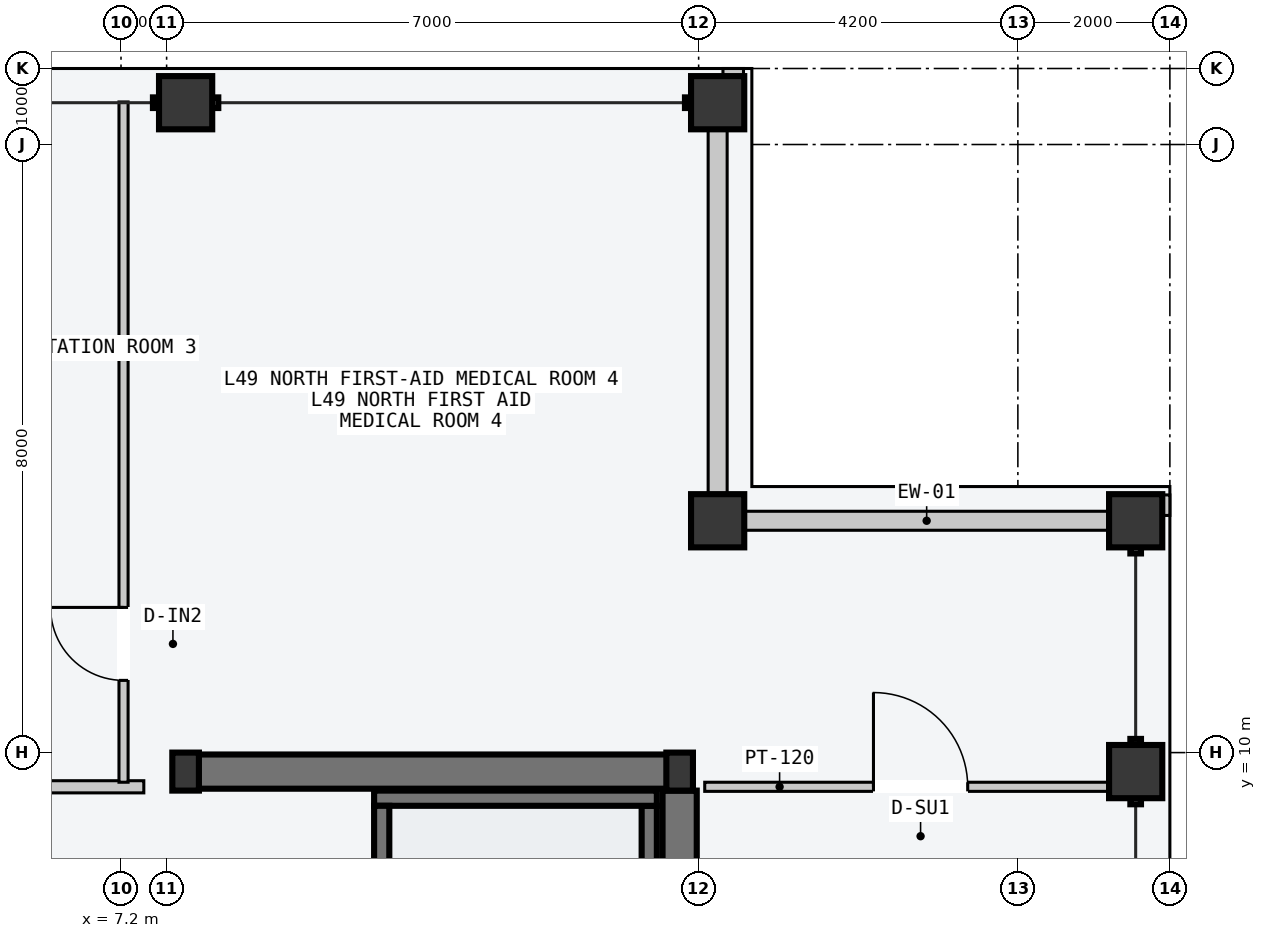
"""IFC4 building model, lengths in metres.
Left out: names, types, materials, properties, quantities, classifications, styles, units other than length and angle.
Written with IfcOpenShell. Run it as: python <this file> out.ifc"""

import sys

from ifc_helpers import new_model, si_unit, direction, frame, frame_2d, origin, origin_2d, place, context, subcontext, project, spatial, rectangle, hollow_rectangle, i_section, extrude, element, fill, save


model = new_model("IFC4")
c1 = context("Model", 3, precision=1e-05, world=origin(), true_north=direction((0.0, 1.0)))
c2 = subcontext(c1, "Body", "Model", "MODEL_VIEW")
j1 = project(units=[si_unit("LENGTHUNIT", "METRE"), si_unit("PLANEANGLEUNIT", "RADIAN")], contexts=[c1])
p1 = place(None, origin())
s1 = spatial("IfcSite", under=j1, at=p1, CompositionType="ELEMENT")
p2 = place(p1, origin())
s2 = spatial("IfcBuilding", under=s1, at=p2, CompositionType="ELEMENT")
p3 = place(p2, frame((0.0, 0.0, 187.5)))
s3 = spatial("IfcBuildingStorey", under=s2, at=p3, CompositionType="ELEMENT", Elevation=187.5)
p4 = place(p3, frame((8.07, 9.75, -0.2), z_axis=(0.0, 0.0, 1.0), x_axis=(1.0, 0.0, 0.0)))
e1 = element("IfcWall", 1, at=p4, inside=s3, PredefinedType="SHEAR", context=c2, shape_type="SweptSolid", body=[
    extrude(rectangle(XDim=6.46, YDim=0.45, at=frame_2d((3.23, 0.0))), origin(), (0.0, 0.0, 1.0), 3.6),
])
p5 = place(p3, frame((14.55, 0.25, -0.2), z_axis=(0.0, 0.0, 1.0), x_axis=(0.0, 1.0, 0.0)))
e2 = element("IfcWall", 2, at=p5, inside=s3, PredefinedType="SHEAR", context=c2, shape_type="SweptSolid", body=[
    extrude(rectangle(XDim=9.25, YDim=0.45, at=frame_2d((4.625, 0.0))), origin(), (0.0, 0.0, 1.0), 3.6),
])
p6 = place(p3, frame((14.15, 1.5, -0.2), z_axis=(0.0, 0.0, 1.0), x_axis=(0.0, 1.0, 0.0)))
e3 = element("IfcWall", 3, at=p6, inside=s3, PredefinedType="SOLIDWALL", context=c2, shape_type="SweptSolid", body=[
    extrude(rectangle(XDim=7.8, YDim=0.2, at=frame_2d((3.9, 0.0))), origin(), (0.0, 0.0, 1.0), 3.6),
])
p7 = place(p3, frame((10.53, 9.4, -0.2), z_axis=(0.0, 0.0, 1.0), x_axis=(1.0, 0.0, 0.0)))
e4 = element("IfcWall", 4, at=p7, inside=s3, PredefinedType="SOLIDWALL", context=c2, shape_type="SweptSolid", body=[
    extrude(rectangle(XDim=3.72, YDim=0.2, at=frame_2d((1.86, 0.0))), origin(), (0.0, 0.0, 1.0), 3.6),
])
p8 = place(p3, frame((10.63, 1.5, -0.2), z_axis=(0.0, 0.0, 1.0), x_axis=(0.0, 1.0, 0.0)))
e5 = element("IfcWall", 5, at=p8, inside=s3, PredefinedType="SOLIDWALL", context=c2, shape_type="SweptSolid", body=[
    extrude(rectangle(XDim=7.8, YDim=0.2, at=frame_2d((3.9, 0.0))), origin(), (0.0, 0.0, 1.0), 3.6),
])
for number, where, z_axis, x_axis in (
    (6, (8.05, 9.75, 0.0), (0.0, 0.0, 1.0), (1.0, 0.0, 0.0)),
    (7, (14.55, 9.75, 0.0), (0.0, 0.0, 1.0), (1.0, 0.0, 0.0)),
):
    element("IfcColumn", number, at=place(p3, frame(where, z_axis=z_axis, x_axis=x_axis)), inside=s3, PredefinedType="COLUMN", context=c2, shape_type="SweptSolid", body=[
        extrude(i_section(OverallWidth=0.35, OverallDepth=0.5, WebThickness=0.02, FlangeThickness=0.032, at=origin_2d()), origin(), (0.0, 0.0, 1.0), 3.6),
    ])
for number, where, z_axis, x_axis in (
    (8, (8.05, 18.55, 0.0), (0.0, 0.0, 1.0), (1.0, 0.0, 0.0)),
    (9, (15.05, 18.55, 0.0), (0.0, 0.0, 1.0), (1.0, 0.0, 0.0)),
    (10, (20.55, 9.75, 0.0), (0.0, 0.0, 1.0), (0.0, 1.0, 0.0)),
    (11, (20.55, 13.05, 0.0), (0.0, 0.0, 1.0), (0.0, 1.0, 0.0)),
    (12, (15.05, 13.05, 0.0), (0.0, 0.0, 1.0), (1.0, 0.0, 0.0)),
):
    element("IfcColumn", number, at=place(p3, frame(where, z_axis=z_axis, x_axis=x_axis)), inside=s3, PredefinedType="COLUMN", context=c2, shape_type="SweptSolid", body=[
        extrude(hollow_rectangle(XDim=0.7, YDim=0.7, WallThickness=0.03, at=origin_2d()), origin(), (0.0, 0.0, 1.0), 3.6),
    ])
for number, where, z_axis, x_axis in (
    (13, (15.41, 13.05, 0.0), (0.0, 0.0, 1.0), (1.0, 0.0, 0.0)),
    (14, (15.05, 13.41, 0.0), (0.0, 0.0, 1.0), (0.0, 1.0, 0.0)),
):
    element("IfcWall", number, at=place(p3, frame(where, z_axis=z_axis, x_axis=x_axis)), inside=s3, PredefinedType="STANDARD", context=c2, shape_type="SweptSolid", body=[
        extrude(rectangle(XDim=4.78, YDim=0.25, at=frame_2d((2.39, 0.0))), origin(), (0.0, 0.0, 1.0), 2.75),
    ])
for number, where, z_axis, x_axis in (
    (15, (15.12, 18.89, 0.0), (0.0, 0.0, 1.0), (1.0, 0.0, 0.0)),
    (16, (20.89, 13.12, 0.0), (0.0, 0.0, 1.0), (0.0, 1.0, 0.0)),
):
    element("IfcWall", number, at=place(p3, frame(where, z_axis=z_axis, x_axis=x_axis)), inside=s3, PredefinedType="PARAPET", context=c2, shape_type="SweptSolid", body=[
        extrude(rectangle(XDim=0.27, YDim=0.22, at=frame_2d((0.135, 0.0))), origin(), (0.0, 0.0, 1.0), 1.2),
    ])
p9 = place(p3, frame((1.26, 9.55, 0.0), z_axis=(0.0, 0.0, 1.0), x_axis=(1.0, 0.0, 0.0)))
e17 = element("IfcWall", 17, at=p9, inside=s3, PredefinedType="PARTITIONING", context=c2, shape_type="SweptSolid", body=[
    extrude(rectangle(XDim=6.24, YDim=0.16, at=frame_2d((3.12, 0.0))), origin(), (0.0, 0.0, 1.0), 3.4),
])
p10 = place(p3, frame((7.233, 9.61, 0.0), z_axis=(0.0, 0.0, 1.0), x_axis=(0.0, 1.0, 0.0)))
e18 = element("IfcWall", 18, at=p10, inside=s3, PredefinedType="PARTITIONING", context=c2, shape_type="SweptSolid", body=[
    extrude(rectangle(XDim=8.95, YDim=0.12, at=frame_2d((4.475, 0.0))), origin(), (0.0, 0.0, 1.0), 3.4),
])
p11 = place(p10, frame((1.34, 0.0, 0.0)))
e19 = element("IfcOpeningElement", 19, at=p11, cuts=e18, PredefinedType="OPENING", context=c2, shape_type="SweptSolid", body=[
    extrude(rectangle(XDim=0.96, YDim=2.18, at=frame_2d((0.48, 1.09))), frame((0.0, 0.07, 0.0), z_axis=(0.0, -1.0, 0.0), x_axis=(1.0, 0.0, 0.0)), (0.0, 0.0, 1.0), 0.14),
])
p12 = place(p3, frame((14.88, 9.55, 0.0), z_axis=(0.0, 0.0, 1.0), x_axis=(1.0, 0.0, 0.0)))
e20 = element("IfcWall", 20, at=p12, inside=s3, PredefinedType="PARTITIONING", context=c2, shape_type="SweptSolid", body=[
    extrude(rectangle(XDim=5.68, YDim=0.12, at=frame_2d((2.84, 0.0))), origin(), (0.0, 0.0, 1.0), 3.4),
])
p13 = place(p12, frame((2.22, 0.0, 0.0)))
e21 = element("IfcOpeningElement", 21, at=p13, cuts=e20, PredefinedType="OPENING", context=c2, shape_type="SweptSolid", body=[
    extrude(rectangle(XDim=1.24, YDim=2.24, at=frame_2d((0.62, 1.12))), frame((0.0, 0.07, 0.0), z_axis=(0.0, -1.0, 0.0), x_axis=(1.0, 0.0, 0.0)), (0.0, 0.0, 1.0), 0.14),
])
p14 = place(p11, origin())
e22 = element("IfcDoor", 22, at=p14, inside=s3, OperationType="SINGLE_SWING_RIGHT", PredefinedType="DOOR", context=c2, shape_type="SweptSolid", body=[
    extrude(rectangle(XDim=0.96, YDim=2.18, at=frame_2d((0.48, 1.09))), frame((0.0, 0.025, 0.0), z_axis=(0.0, -1.0, 0.0), x_axis=(1.0, 0.0, 0.0)), (0.0, 0.0, 1.0), 0.05),
])
fill(e19, e22)
p15 = place(p13, origin())
e23 = element("IfcDoor", 23, at=p15, inside=s3, OperationType="SINGLE_SWING_LEFT", PredefinedType="DOOR", context=c2, shape_type="SweptSolid", body=[
    extrude(rectangle(XDim=1.24, YDim=2.24, at=frame_2d((0.62, 1.12))), frame((0.0, 0.025, 0.0), z_axis=(0.0, -1.0, 0.0), x_axis=(1.0, 0.0, 0.0)), (0.0, 0.0, 1.0), 0.05),
])
fill(e21, e23)
save(model, sys.argv[1])
